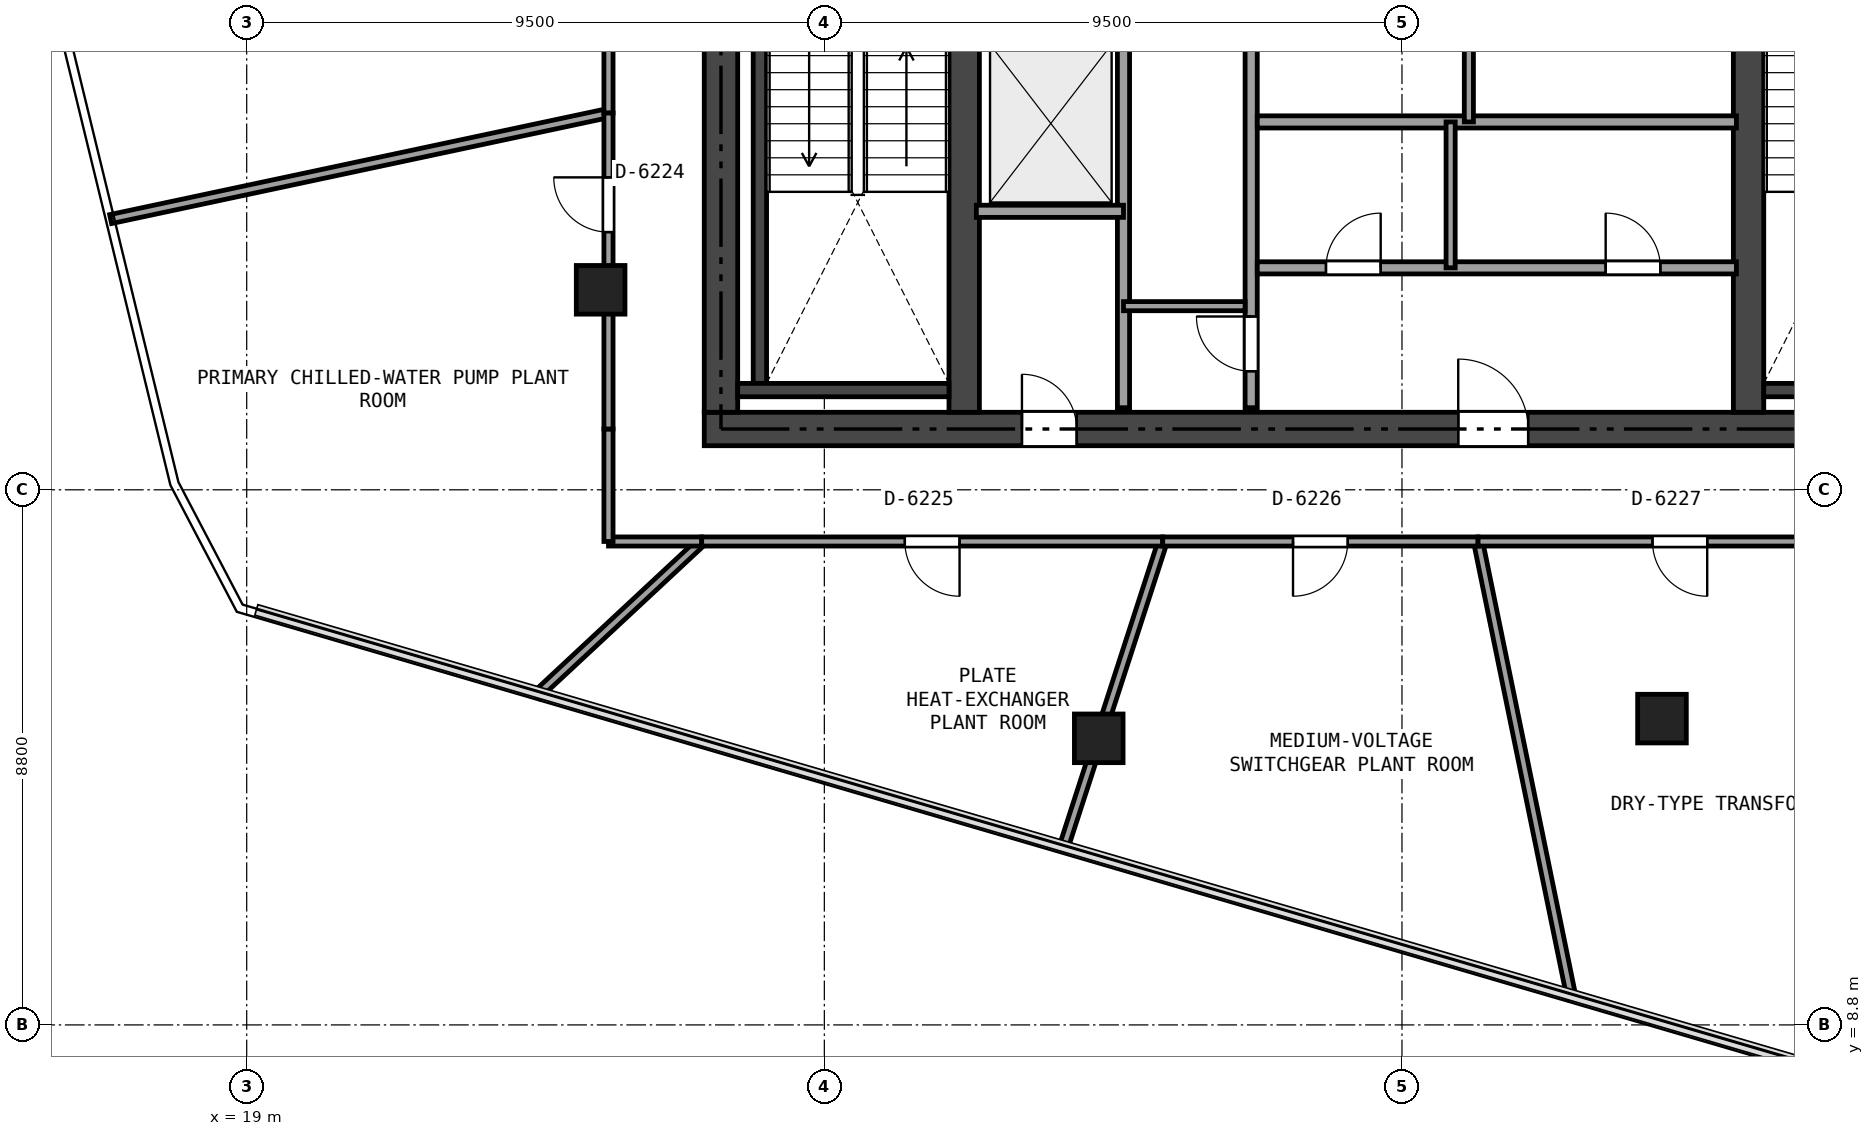
"""IFC4 building model, lengths in metres.
Left out: names, types, materials, properties, quantities, classifications, styles, units other than length and angle.
Written with IfcOpenShell. Run it as: python <this file> out.ifc"""

import sys

from ifc_helpers import new_model, si_unit, direction, frame, frame_2d, origin, origin_2d, place, context, subcontext, project, spatial, rectangle, extrude, element, fill, save


model = new_model("IFC4")
c1 = context("Model", 3, precision=1e-05, world=origin(), true_north=direction((0.0, 1.0)))
c2 = subcontext(c1, "Body", "Model", "MODEL_VIEW")
j1 = project(units=[si_unit("LENGTHUNIT", "METRE"), si_unit("PLANEANGLEUNIT", "RADIAN")], contexts=[c1])
p1 = place(None, origin())
s1 = spatial("IfcSite", under=j1, at=p1, CompositionType="ELEMENT")
p2 = place(p1, origin())
s2 = spatial("IfcBuilding", under=s1, at=p2, CompositionType="ELEMENT")
p3 = place(p2, frame((0.0, 0.0, 231.9)))
s3 = spatial("IfcBuildingStorey", under=s2, at=p3, CompositionType="ELEMENT", Elevation=231.9)
p4 = place(p3, frame((26.525, 18.6, 0.0), z_axis=(0.0, 0.0, 1.0), x_axis=(1.0, 0.0, 0.0)))
e1 = element("IfcWall", 1, at=p4, inside=s3, PredefinedType="SHEAR", context=c2, shape_type="SweptSolid", body=[
    extrude(rectangle(XDim=21.35, YDim=0.55, at=frame_2d((10.675, 0.0))), origin(), (0.0, 0.0, 1.0), 3.18),
])
p5 = place(p4, frame((12.4, 0.0, 0.0)))
e2 = element("IfcOpeningElement", 2, at=p5, cuts=e1, PredefinedType="OPENING", context=c2, shape_type="SweptSolid", body=[
    extrude(rectangle(XDim=1.15, YDim=2.15, at=frame_2d((0.575, 1.075))), frame((0.0, 0.285, 0.0), z_axis=(0.0, -1.0, 0.0), x_axis=(1.0, 0.0, 0.0)), (0.0, 0.0, 1.0), 0.57),
])
p6 = place(p4, frame((5.225, 0.0, 0.0)))
e3 = element("IfcOpeningElement", 3, at=p6, cuts=e1, PredefinedType="OPENING", context=c2, shape_type="SweptSolid", body=[
    extrude(rectangle(XDim=0.9, YDim=2.1, at=frame_2d((0.45, 1.05))), frame((0.0, 0.285, 0.0), z_axis=(0.0, -1.0, 0.0), x_axis=(1.0, 0.0, 0.0)), (0.0, 0.0, 1.0), 0.57),
])
p7 = place(p3, frame((26.8, 18.875, 0.0), z_axis=(0.0, 0.0, 1.0), x_axis=(0.0, 1.0, 0.0)))
e4 = element("IfcWall", 4, at=p7, inside=s3, PredefinedType="SHEAR", context=c2, shape_type="SweptSolid", body=[
    extrude(rectangle(XDim=15.05, YDim=0.55, at=frame_2d((7.525, 0.0))), origin(), (0.0, 0.0, 1.0), 3.18),
])
p8 = place(p3, frame((30.8, 18.875, 0.0), z_axis=(0.0, 0.0, 1.0), x_axis=(0.0, 1.0, 0.0)))
e5 = element("IfcWall", 5, at=p8, inside=s3, PredefinedType="SHEAR", context=c2, shape_type="SweptSolid", body=[
    extrude(rectangle(XDim=15.05, YDim=0.5, at=frame_2d((7.525, 0.0))), origin(), (0.0, 0.0, 1.0), 3.18),
])
p9 = place(p8, frame((6.625, 0.0, 0.0)))
e6 = element("IfcOpeningElement", 6, at=p9, cuts=e5, PredefinedType="OPENING", context=c2, shape_type="SweptSolid", body=[
    extrude(rectangle(XDim=1.1, YDim=2.15, at=frame_2d((0.55, 1.075))), frame((0.0, 0.26, 0.0), z_axis=(0.0, -1.0, 0.0), x_axis=(1.0, 0.0, 0.0)), (0.0, 0.0, 1.0), 0.52),
])
p10 = place(p8, frame((8.425, 0.0, 0.0)))
e7 = element("IfcOpeningElement", 7, at=p10, cuts=e5, PredefinedType="OPENING", context=c2, shape_type="SweptSolid", body=[
    extrude(rectangle(XDim=0.9, YDim=2.1, at=frame_2d((0.45, 1.05))), frame((0.0, 0.26, 0.0), z_axis=(0.0, -1.0, 0.0), x_axis=(1.0, 0.0, 0.0)), (0.0, 0.0, 1.0), 0.52),
])
p11 = place(p3, frame((43.7, 18.875, 0.0), z_axis=(0.0, 0.0, 1.0), x_axis=(0.0, 1.0, 0.0)))
e8 = element("IfcWall", 8, at=p11, inside=s3, PredefinedType="SHEAR", context=c2, shape_type="SweptSolid", body=[
    extrude(rectangle(XDim=15.05, YDim=0.5, at=frame_2d((7.525, 0.0))), origin(), (0.0, 0.0, 1.0), 3.18),
])
p12 = place(p11, frame((8.125, 0.0, 0.0)))
e9 = element("IfcOpeningElement", 9, at=p12, cuts=e8, PredefinedType="OPENING", context=c2, shape_type="SweptSolid", body=[
    extrude(rectangle(XDim=0.9, YDim=2.1, at=frame_2d((0.45, 1.05))), frame((0.0, 0.26, 0.0), z_axis=(0.0, -1.0, 0.0), x_axis=(1.0, 0.0, 0.0)), (0.0, 0.0, 1.0), 0.52),
])
p13 = place(p3, frame((27.44, 19.35, 0.0), z_axis=(0.0, 0.0, 1.0), x_axis=(0.0, 1.0, 0.0)))
e10 = element("IfcWall", 10, at=p13, inside=s3, PredefinedType="SHEAR", context=c2, shape_type="SweptSolid", body=[
    extrude(rectangle(XDim=7.4, YDim=0.22, at=frame_2d((3.7, 0.0))), origin(), (0.0, 0.0, 1.0), 3.18),
])
p14 = place(p3, frame((27.075, 19.24, 0.0), z_axis=(0.0, 0.0, 1.0), x_axis=(1.0, 0.0, 0.0)))
e11 = element("IfcWall", 11, at=p14, inside=s3, PredefinedType="SHEAR", context=c2, shape_type="SweptSolid", body=[
    extrude(rectangle(XDim=3.475, YDim=0.22, at=frame_2d((1.738, 0.0))), origin(), (0.0, 0.0, 1.0), 3.18),
])
p15 = place(p3, frame((43.95, 19.24, 0.0), z_axis=(0.0, 0.0, 1.0), x_axis=(1.0, 0.0, 0.0)))
e12 = element("IfcWall", 12, at=p15, inside=s3, PredefinedType="SHEAR", context=c2, shape_type="SweptSolid", body=[
    extrude(rectangle(XDim=3.375, YDim=0.22, at=frame_2d((1.688, 0.0))), origin(), (0.0, 0.0, 1.0), 3.18),
])
for number, where, z_axis, x_axis in (
    (13, (24.821, 20.889, 0.0), (0.0, 0.0, 1.0), (1.0, 0.0, 0.0)),
    (14, (33.013, 13.513, 0.0), (0.0, 0.0, 1.0), (1.0, 0.0, 0.0)),
    (15, (42.276, 13.837, 0.0), (0.0, 0.0, 1.0), (1.0, 0.0, 0.0)),
):
    element("IfcColumn", number, at=place(p3, frame(where, z_axis=z_axis, x_axis=x_axis)), inside=s3, PredefinedType="COLUMN", context=c2, shape_type="SweptSolid", body=[
        extrude(rectangle(XDim=0.8, YDim=0.8, at=origin_2d()), origin(), (0.0, 0.0, 1.0), 3.18),
    ])
p16 = place(p3, frame((35.52, 18.95, 0.0), z_axis=(0.0, 0.0, 1.0), x_axis=(0.0, 1.0, 0.0)))
e16 = element("IfcWall", 16, at=p16, inside=s3, PredefinedType="SOLIDWALL", context=c2, shape_type="SweptSolid", body=[
    extrude(rectangle(XDim=14.9, YDim=0.2, at=frame_2d((7.45, 0.0))), origin(), (0.0, 0.0, 1.0), 2.701),
])
p17 = place(p16, frame((7.755, 0.0, 0.0)))
e17 = element("IfcOpeningElement", 17, at=p17, cuts=e16, PredefinedType="OPENING", context=c2, shape_type="SweptSolid", body=[
    extrude(rectangle(XDim=0.95, YDim=2.15, at=frame_2d((0.475, 1.075))), frame((0.0, 0.11, 0.0), z_axis=(0.0, -1.0, 0.0), x_axis=(1.0, 0.0, 0.0)), (0.0, 0.0, 1.0), 0.22),
])
p18 = place(p16, frame((0.6, 0.0, 0.0)))
e18 = element("IfcOpeningElement", 18, at=p18, cuts=e16, PredefinedType="OPENING", context=c2, shape_type="SweptSolid", body=[
    extrude(rectangle(XDim=0.9, YDim=2.1, at=frame_2d((0.45, 1.05))), frame((0.0, 0.11, 0.0), z_axis=(0.0, -1.0, 0.0), x_axis=(1.0, 0.0, 0.0)), (0.0, 0.0, 1.0), 0.22),
])
p19 = place(p3, frame((33.42, 18.95, 0.0), z_axis=(0.0, 0.0, 1.0), x_axis=(0.0, 1.0, 0.0)))
e19 = element("IfcWall", 19, at=p19, inside=s3, PredefinedType="SOLIDWALL", context=c2, shape_type="SweptSolid", body=[
    extrude(rectangle(XDim=6.13, YDim=0.2, at=frame_2d((3.065, 0.0))), origin(), (0.0, 0.0, 1.0), 2.701),
])
p20 = place(p3, frame((31.0, 22.18, 0.0), z_axis=(0.0, 0.0, 1.0), x_axis=(1.0, 0.0, 0.0)))
e20 = element("IfcWall", 20, at=p20, inside=s3, PredefinedType="SOLIDWALL", context=c2, shape_type="SweptSolid", body=[
    extrude(rectangle(XDim=2.42, YDim=0.2, at=frame_2d((1.21, 0.0))), origin(), (0.0, 0.0, 1.0), 3.18),
])
p21 = place(p3, frame((33.42, 20.62, 0.0), z_axis=(0.0, 0.0, 1.0), x_axis=(1.0, 0.0, 0.0)))
e21 = element("IfcWall", 21, at=p21, inside=s3, PredefinedType="PARTITIONING", context=c2, shape_type="SweptSolid", body=[
    extrude(rectangle(XDim=2.0, YDim=0.15, at=frame_2d((1.0, 0.0))), origin(), (0.0, 0.0, 1.0), 3.18),
])
p22 = place(p3, frame((35.62, 23.65, 0.0), z_axis=(0.0, 0.0, 1.0), x_axis=(1.0, 0.0, 0.0)))
e22 = element("IfcWall", 22, at=p22, inside=s3, PredefinedType="SOLIDWALL", context=c2, shape_type="SweptSolid", body=[
    extrude(rectangle(XDim=7.88, YDim=0.2, at=frame_2d((3.94, 0.0))), origin(), (0.0, 0.0, 1.0), 2.701),
])
p23 = place(p3, frame((35.62, 21.25, 0.0), z_axis=(0.0, 0.0, 1.0), x_axis=(1.0, 0.0, 0.0)))
e23 = element("IfcWall", 23, at=p23, inside=s3, PredefinedType="SOLIDWALL", context=c2, shape_type="SweptSolid", body=[
    extrude(rectangle(XDim=7.88, YDim=0.2, at=frame_2d((3.94, 0.0))), origin(), (0.0, 0.0, 1.0), 3.18),
])
p24 = place(p23, frame((1.13, 0.0, 0.0)))
e24 = element("IfcOpeningElement", 24, at=p24, cuts=e23, PredefinedType="OPENING", context=c2, shape_type="SweptSolid", body=[
    extrude(rectangle(XDim=0.9, YDim=2.1, at=frame_2d((0.45, 1.05))), frame((0.0, 0.11, 0.0), z_axis=(0.0, -1.0, 0.0), x_axis=(1.0, 0.0, 0.0)), (0.0, 0.0, 1.0), 0.22),
])
p25 = place(p23, frame((5.73, 0.0, 0.0)))
e25 = element("IfcOpeningElement", 25, at=p25, cuts=e23, PredefinedType="OPENING", context=c2, shape_type="SweptSolid", body=[
    extrude(rectangle(XDim=0.9, YDim=2.1, at=frame_2d((0.45, 1.05))), frame((0.0, 0.11, 0.0), z_axis=(0.0, -1.0, 0.0), x_axis=(1.0, 0.0, 0.0)), (0.0, 0.0, 1.0), 0.22),
])
p26 = place(p3, frame((39.1, 23.65, 0.0), z_axis=(0.0, 0.0, 1.0), x_axis=(0.0, 1.0, 0.0)))
e26 = element("IfcWall", 26, at=p26, inside=s3, PredefinedType="PARTITIONING", context=c2, shape_type="SweptSolid", body=[
    extrude(rectangle(XDim=2.55, YDim=0.15, at=frame_2d((1.275, 0.0))), origin(), (0.0, 0.0, 1.0), 2.701),
])
p27 = place(p3, frame((38.8, 21.25, 0.0), z_axis=(0.0, 0.0, 1.0), x_axis=(0.0, 1.0, 0.0)))
e27 = element("IfcWall", 27, at=p27, inside=s3, PredefinedType="PARTITIONING", context=c2, shape_type="SweptSolid", body=[
    extrude(rectangle(XDim=2.4, YDim=0.15, at=frame_2d((1.2, 0.0))), origin(), (0.0, 0.0, 1.0), 2.701),
])
p28 = place(p3, frame((16.762, 22.052, 0.0), z_axis=(0.0, 0.0, 1.0), x_axis=(0.978062839509, 0.208310062097, 0.0)))
e28 = element("IfcWall", 28, at=p28, inside=s3, PredefinedType="PARTITIONING", context=c2, shape_type="SweptSolid", body=[
    extrude(rectangle(XDim=8.372, YDim=0.15, at=frame_2d((4.186, 0.0))), origin(), (0.0, 0.0, 1.0), 2.705),
])
p29 = place(p3, frame((24.95, 23.796, 0.0), z_axis=(0.0, 0.0, 1.0), x_axis=(0.0, 1.0, 0.0)))
e29 = element("IfcWall", 29, at=p29, inside=s3, PredefinedType="PARTITIONING", context=c2, shape_type="SweptSolid", body=[
    extrude(rectangle(XDim=6.584, YDim=0.15, at=frame_2d((3.292, 0.0))), origin(), (0.0, 0.0, 1.0), 2.625),
])
p30 = place(p29, frame((1.727, 0.0, 0.0)))
e30 = element("IfcOpeningElement", 30, at=p30, cuts=e29, PredefinedType="OPENING", context=c2, shape_type="SweptSolid", body=[
    extrude(rectangle(XDim=0.9, YDim=2.0, at=frame_2d((0.45, 1.0))), frame((0.0, 0.085, 0.0), z_axis=(0.0, -1.0, 0.0), x_axis=(1.0, 0.0, 0.0)), (0.0, 0.0, 1.0), 0.17),
])
p31 = place(p3, frame((23.767, 14.221, 0.0), z_axis=(0.0, 0.0, 1.0), x_axis=(0.731822693404, 0.681495080994, 0.0)))
e31 = element("IfcWall", 31, at=p31, inside=s3, PredefinedType="PARTITIONING", context=c2, shape_type="SweptSolid", body=[
    extrude(rectangle(XDim=3.711, YDim=0.15, at=frame_2d((1.855, 0.0))), origin(), (0.0, 0.0, 1.0), 3.18),
])
p32 = place(p3, frame((26.483, 16.75, 0.0), z_axis=(0.0, 0.0, 1.0), x_axis=(-1.0, 0.0, 0.0)))
e32 = element("IfcWall", 32, at=p32, inside=s3, PredefinedType="PARTITIONING", context=c2, shape_type="SweptSolid", body=[
    extrude(rectangle(XDim=1.533, YDim=0.15, at=frame_2d((0.767, 0.0))), origin(), (0.0, 0.0, 1.0), 3.18),
])
p33 = place(p3, frame((24.95, 16.75, 0.0), z_axis=(0.0, 0.0, 1.0), x_axis=(0.0, 1.0, 0.0)))
e33 = element("IfcWall", 33, at=p33, inside=s3, PredefinedType="PARTITIONING", context=c2, shape_type="SweptSolid", body=[
    extrude(rectangle(XDim=1.85, YDim=0.15, at=frame_2d((0.925, 0.0))), origin(), (0.0, 0.0, 1.0), 3.18),
])
p34 = place(p3, frame((24.95, 18.6, 0.0), z_axis=(0.0, 0.0, 1.0), x_axis=(0.0, 1.0, 0.0)))
e34 = element("IfcWall", 34, at=p34, inside=s3, PredefinedType="PARTITIONING", context=c2, shape_type="SweptSolid", body=[
    extrude(rectangle(XDim=5.196, YDim=0.15, at=frame_2d((2.598, 0.0))), origin(), (0.0, 0.0, 1.0), 2.853),
])
p35 = place(p34, frame((3.238, 0.0, 0.0)))
e35 = element("IfcOpeningElement", 35, at=p35, cuts=e34, PredefinedType="OPENING", context=c2, shape_type="SweptSolid", body=[
    extrude(rectangle(XDim=0.9, YDim=2.0, at=frame_2d((0.45, 1.0))), frame((0.0, 0.085, 0.0), z_axis=(0.0, -1.0, 0.0), x_axis=(1.0, 0.0, 0.0)), (0.0, 0.0, 1.0), 0.17),
])
p36 = place(p3, frame((32.427, 11.698, 0.0), z_axis=(0.0, 0.0, 1.0), x_axis=(0.308411389708, 0.951253076052, 0.0)))
e36 = element("IfcWall", 36, at=p36, inside=s3, PredefinedType="PARTITIONING", context=c2, shape_type="SweptSolid", body=[
    extrude(rectangle(XDim=5.311, YDim=0.15, at=frame_2d((2.655, 0.0))), origin(), (0.0, 0.0, 1.0), 2.625),
])
p37 = place(p3, frame((34.065, 16.75, 0.0), z_axis=(0.0, 0.0, 1.0), x_axis=(-1.0, 0.0, 0.0)))
e37 = element("IfcWall", 37, at=p37, inside=s3, PredefinedType="PARTITIONING", context=c2, shape_type="SweptSolid", body=[
    extrude(rectangle(XDim=7.582, YDim=0.15, at=frame_2d((3.791, 0.0))), origin(), (0.0, 0.0, 1.0), 2.625),
])
p38 = place(p37, frame((3.341, 0.0, 0.0)))
e38 = element("IfcOpeningElement", 38, at=p38, cuts=e37, PredefinedType="OPENING", context=c2, shape_type="SweptSolid", body=[
    extrude(rectangle(XDim=0.9, YDim=2.0, at=frame_2d((0.45, 1.0))), frame((0.0, 0.085, 0.0), z_axis=(0.0, -1.0, 0.0), x_axis=(1.0, 0.0, 0.0)), (0.0, 0.0, 1.0), 0.17),
])
p39 = place(p3, frame((40.79, 9.239, 0.0), z_axis=(0.0, 0.0, 1.0), x_axis=(-0.200737291339, 0.979645109142, 0.0)))
e39 = element("IfcWall", 39, at=p39, inside=s3, PredefinedType="PARTITIONING", context=c2, shape_type="SweptSolid", body=[
    extrude(rectangle(XDim=7.667, YDim=0.15, at=frame_2d((3.833, 0.0))), origin(), (0.0, 0.0, 1.0), 2.705),
])
p40 = place(p3, frame((39.251, 16.75, 0.0), z_axis=(0.0, 0.0, 1.0), x_axis=(-1.0, 0.0, 0.0)))
e40 = element("IfcWall", 40, at=p40, inside=s3, PredefinedType="PARTITIONING", context=c2, shape_type="SweptSolid", body=[
    extrude(rectangle(XDim=5.186, YDim=0.15, at=frame_2d((2.593, 0.0))), origin(), (0.0, 0.0, 1.0), 2.625),
])
p41 = place(p40, frame((2.143, 0.0, 0.0)))
e41 = element("IfcOpeningElement", 41, at=p41, cuts=e40, PredefinedType="OPENING", context=c2, shape_type="SweptSolid", body=[
    extrude(rectangle(XDim=0.9, YDim=2.0, at=frame_2d((0.45, 1.0))), frame((0.0, 0.085, 0.0), z_axis=(0.0, -1.0, 0.0), x_axis=(1.0, 0.0, 0.0)), (0.0, 0.0, 1.0), 0.17),
])
p42 = place(p3, frame((45.889, 16.75, 0.0), z_axis=(0.0, 0.0, 1.0), x_axis=(-1.0, 0.0, 0.0)))
e42 = element("IfcWall", 42, at=p42, inside=s3, PredefinedType="PARTITIONING", context=c2, shape_type="SweptSolid", body=[
    extrude(rectangle(XDim=6.638, YDim=0.15, at=frame_2d((3.319, 0.0))), origin(), (0.0, 0.0, 1.0), 2.625),
])
p43 = place(p42, frame((2.869, 0.0, 0.0)))
e43 = element("IfcOpeningElement", 43, at=p43, cuts=e42, PredefinedType="OPENING", context=c2, shape_type="SweptSolid", body=[
    extrude(rectangle(XDim=0.9, YDim=2.0, at=frame_2d((0.45, 1.0))), frame((0.0, 0.085, 0.0), z_axis=(0.0, -1.0, 0.0), x_axis=(1.0, 0.0, 0.0)), (0.0, 0.0, 1.0), 0.17),
])
p44 = place(p5, origin())
e44 = element("IfcDoor", 44, at=p44, inside=s3, OperationType="SINGLE_SWING_LEFT", PredefinedType="DOOR", context=c2, shape_type="SweptSolid", body=[
    extrude(rectangle(XDim=1.15, YDim=2.15, at=frame_2d((0.575, 1.075))), frame((0.0, 0.025, 0.0), z_axis=(0.0, -1.0, 0.0), x_axis=(1.0, 0.0, 0.0)), (0.0, 0.0, 1.0), 0.05),
])
fill(e2, e44)
p45 = place(p6, origin())
e45 = element("IfcDoor", 45, at=p45, inside=s3, OperationType="SINGLE_SWING_LEFT", PredefinedType="DOOR", context=c2, shape_type="SweptSolid", body=[
    extrude(rectangle(XDim=0.9, YDim=2.1, at=frame_2d((0.45, 1.05))), frame((0.0, 0.025, 0.0), z_axis=(0.0, -1.0, 0.0), x_axis=(1.0, 0.0, 0.0)), (0.0, 0.0, 1.0), 0.05),
])
fill(e3, e45)
p46 = place(p18, origin())
e46 = element("IfcDoor", 46, at=p46, inside=s3, OperationType="SINGLE_SWING_RIGHT", PredefinedType="DOOR", context=c2, shape_type="SweptSolid", body=[
    extrude(rectangle(XDim=0.9, YDim=2.1, at=frame_2d((0.45, 1.05))), frame((0.0, 0.025, 0.0), z_axis=(0.0, -1.0, 0.0), x_axis=(1.0, 0.0, 0.0)), (0.0, 0.0, 1.0), 0.05),
])
fill(e18, e46)
p47 = place(p24, origin())
e47 = element("IfcDoor", 47, at=p47, inside=s3, OperationType="SINGLE_SWING_RIGHT", PredefinedType="DOOR", context=c2, shape_type="SweptSolid", body=[
    extrude(rectangle(XDim=0.9, YDim=2.1, at=frame_2d((0.45, 1.05))), frame((0.0, 0.025, 0.0), z_axis=(0.0, -1.0, 0.0), x_axis=(1.0, 0.0, 0.0)), (0.0, 0.0, 1.0), 0.05),
])
fill(e24, e47)
p48 = place(p25, origin())
e48 = element("IfcDoor", 48, at=p48, inside=s3, OperationType="SINGLE_SWING_LEFT", PredefinedType="DOOR", context=c2, shape_type="SweptSolid", body=[
    extrude(rectangle(XDim=0.9, YDim=2.1, at=frame_2d((0.45, 1.05))), frame((0.0, 0.025, 0.0), z_axis=(0.0, -1.0, 0.0), x_axis=(1.0, 0.0, 0.0)), (0.0, 0.0, 1.0), 0.05),
])
fill(e25, e48)
p49 = place(p35, origin())
e49 = element("IfcDoor", 49, at=p49, inside=s3, OperationType="SINGLE_SWING_RIGHT", PredefinedType="DOOR", context=c2, shape_type="SweptSolid", body=[
    extrude(rectangle(XDim=0.9, YDim=2.0, at=frame_2d((0.45, 1.0))), frame((0.0, 0.025, 0.0), z_axis=(0.0, -1.0, 0.0), x_axis=(1.0, 0.0, 0.0)), (0.0, 0.0, 1.0), 0.05),
])
fill(e35, e49)
p50 = place(p38, origin())
e50 = element("IfcDoor", 50, at=p50, inside=s3, OperationType="SINGLE_SWING_LEFT", PredefinedType="DOOR", context=c2, shape_type="SweptSolid", body=[
    extrude(rectangle(XDim=0.9, YDim=2.0, at=frame_2d((0.45, 1.0))), frame((0.0, 0.025, 0.0), z_axis=(0.0, -1.0, 0.0), x_axis=(1.0, 0.0, 0.0)), (0.0, 0.0, 1.0), 0.05),
])
fill(e38, e50)
p51 = place(p41, origin())
e51 = element("IfcDoor", 51, at=p51, inside=s3, OperationType="SINGLE_SWING_RIGHT", PredefinedType="DOOR", context=c2, shape_type="SweptSolid", body=[
    extrude(rectangle(XDim=0.9, YDim=2.0, at=frame_2d((0.45, 1.0))), frame((0.0, 0.025, 0.0), z_axis=(0.0, -1.0, 0.0), x_axis=(1.0, 0.0, 0.0)), (0.0, 0.0, 1.0), 0.05),
])
fill(e41, e51)
p52 = place(p43, origin())
e52 = element("IfcDoor", 52, at=p52, inside=s3, OperationType="SINGLE_SWING_LEFT", PredefinedType="DOOR", context=c2, shape_type="SweptSolid", body=[
    extrude(rectangle(XDim=0.9, YDim=2.0, at=frame_2d((0.45, 1.0))), frame((0.0, 0.025, 0.0), z_axis=(0.0, -1.0, 0.0), x_axis=(1.0, 0.0, 0.0)), (0.0, 0.0, 1.0), 0.05),
])
fill(e43, e52)
save(model, sys.argv[1])
